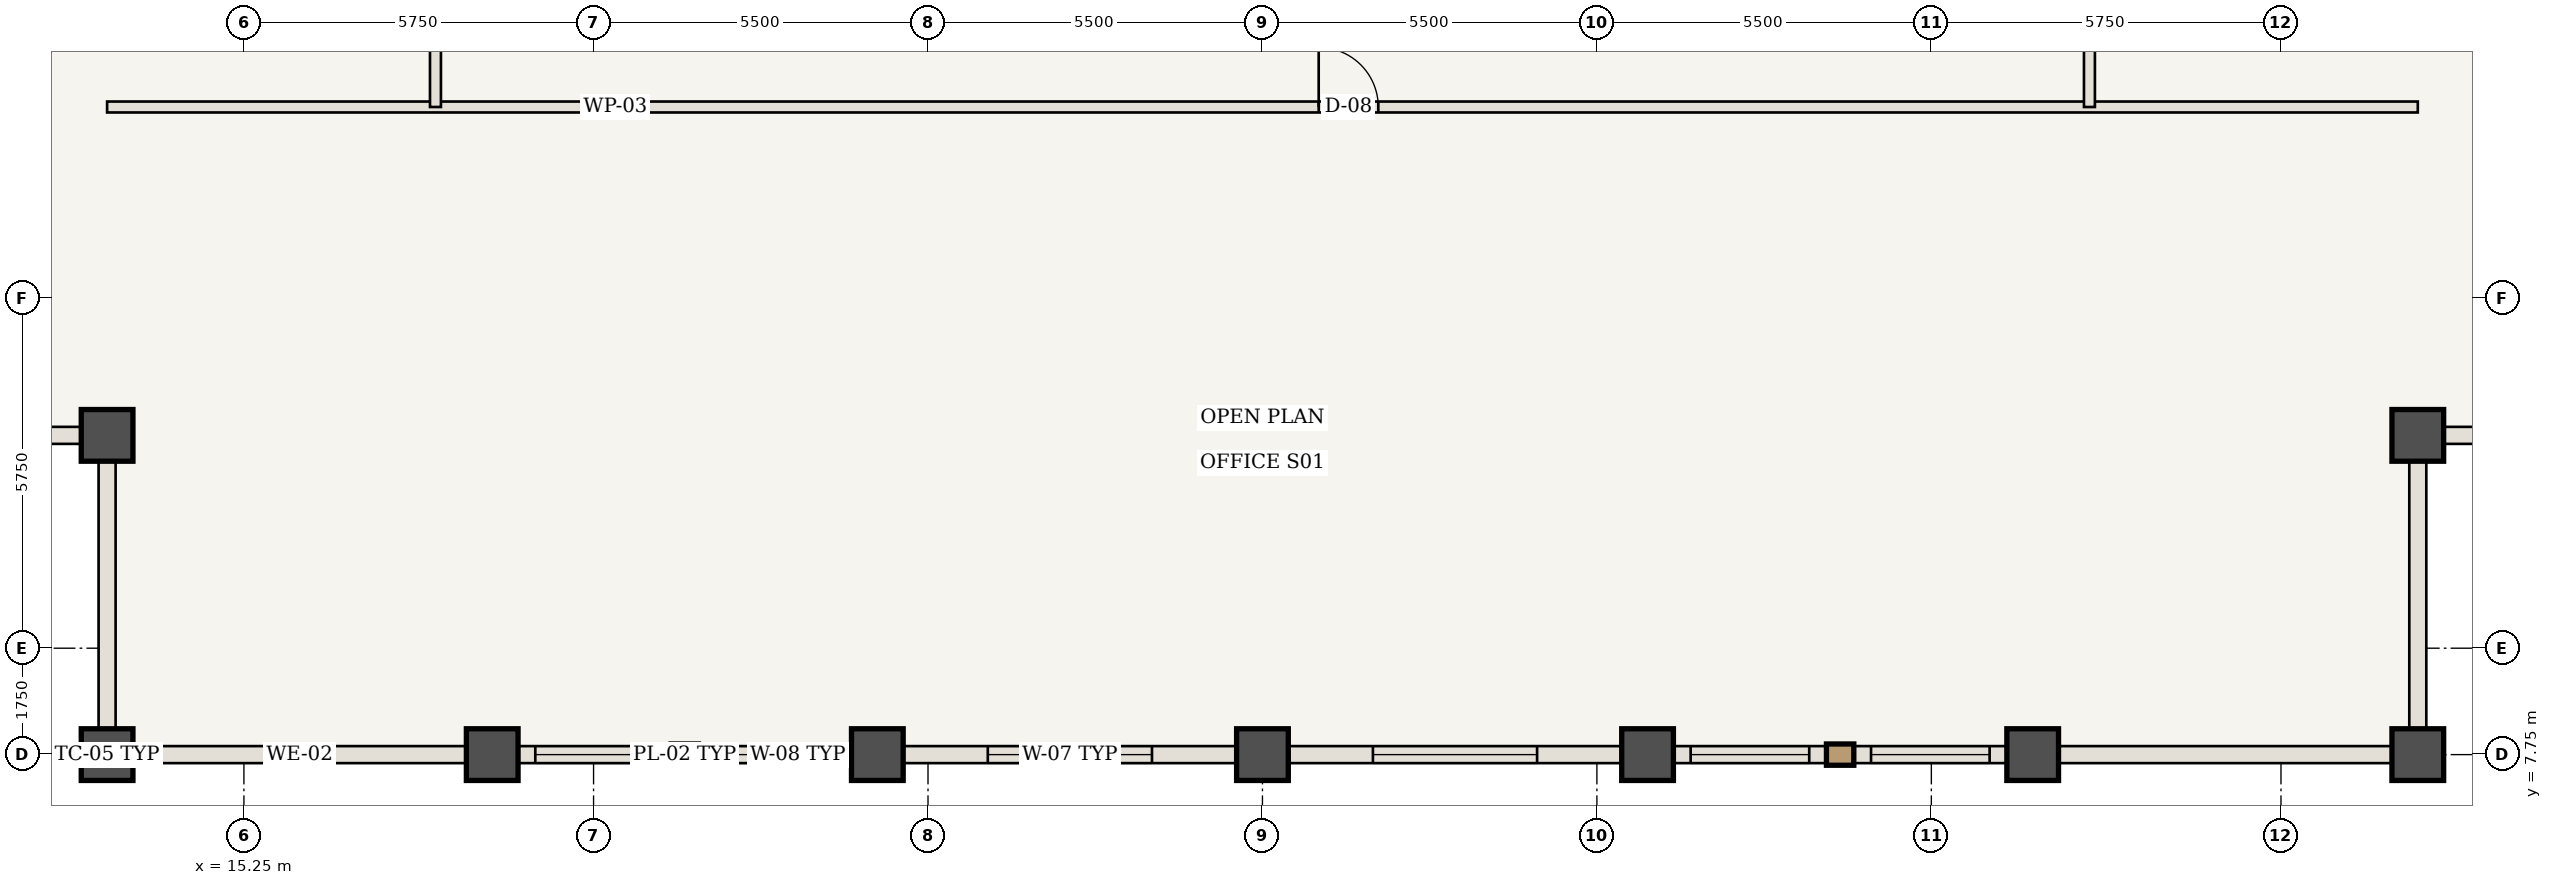
"""IFC4 building model, lengths in metres.
Left out: names, types, materials, properties, quantities, classifications, styles, units other than length and angle.
Written with IfcOpenShell. Run it as: python <this file> out.ifc"""

import sys

from ifc_helpers import new_model, si_unit, direction, frame, frame_2d, origin, origin_2d, place, context, subcontext, project, spatial, rectangle, extrude, element, fill, save


model = new_model("IFC4")
c1 = context("Model", 3, precision=1e-05, world=origin(), true_north=direction((0.0, 1.0)))
c2 = subcontext(c1, "Body", "Model", "MODEL_VIEW")
j1 = project(units=[si_unit("LENGTHUNIT", "METRE"), si_unit("PLANEANGLEUNIT", "RADIAN")], contexts=[c1])
p1 = place(None, origin())
s1 = spatial("IfcSite", under=j1, at=p1, CompositionType="ELEMENT")
p2 = place(p1, origin())
s2 = spatial("IfcBuilding", under=s1, at=p2, CompositionType="ELEMENT")
p3 = place(p2, frame((0.0, 0.0, 186.9)))
s3 = spatial("IfcBuildingStorey", under=s2, at=p3, CompositionType="ELEMENT", Elevation=186.9)
for number, where, z_axis, x_axis in (
    (1, (13.0, 7.75, 0.0), (0.0, 0.0, 1.0), (1.0, 0.0, 0.0)),
    (2, (13.0, 13.0, 0.0), (0.0, 0.0, 1.0), (1.0, 0.0, 0.0)),
    (3, (51.0, 7.75, 0.0), (0.0, 0.0, 1.0), (1.0, 0.0, 0.0)),
    (4, (51.0, 13.0, 0.0), (0.0, 0.0, 1.0), (1.0, 0.0, 0.0)),
    (5, (19.333, 7.75, 0.0), (0.0, 0.0, 1.0), (1.0, 0.0, 0.0)),
    (6, (25.667, 7.75, 0.0), (0.0, 0.0, 1.0), (1.0, 0.0, 0.0)),
    (7, (32.0, 7.75, 0.0), (0.0, 0.0, 1.0), (1.0, 0.0, 0.0)),
    (8, (38.333, 7.75, 0.0), (0.0, 0.0, 1.0), (1.0, 0.0, 0.0)),
    (9, (44.667, 7.75, 0.0), (0.0, 0.0, 1.0), (1.0, 0.0, 0.0)),
):
    element("IfcColumn", number, at=place(p3, frame(where, z_axis=z_axis, x_axis=x_axis)), inside=s3, PredefinedType="COLUMN", context=c2, shape_type="SweptSolid", body=[
        extrude(rectangle(XDim=0.85, YDim=0.85, at=origin_2d()), origin(), (0.0, 0.0, 1.0), 3.85),
    ])
p4 = place(p3, frame((13.0, 18.4, 0.0), z_axis=(0.0, 0.0, 1.0), x_axis=(1.0, 0.0, 0.0)))
e10 = element("IfcWall", 10, at=p4, inside=s3, PredefinedType="STANDARD", context=c2, shape_type="SweptSolid", body=[
    extrude(rectangle(XDim=38.0, YDim=0.18, at=frame_2d((19.0, 0.0))), origin(), (0.0, 0.0, 1.0), 3.43),
])
p5 = place(p4, frame((19.925, 0.0, 0.0)))
e11 = element("IfcOpeningElement", 11, at=p5, cuts=e10, PredefinedType="OPENING", context=c2, shape_type="SweptSolid", body=[
    extrude(rectangle(XDim=0.98, YDim=2.2, at=frame_2d((0.49, 1.1))), frame((0.0, 0.1, 0.0), z_axis=(0.0, -1.0, 0.0), x_axis=(1.0, 0.0, 0.0)), (0.0, 0.0, 1.0), 0.2),
])
p6 = place(p3, frame((18.4, 18.4, 0.0), z_axis=(0.0, 0.0, 1.0), x_axis=(0.0, 1.0, 0.0)))
e12 = element("IfcWall", 12, at=p6, inside=s3, PredefinedType="STANDARD", context=c2, shape_type="SweptSolid", body=[
    extrude(rectangle(XDim=6.317, YDim=0.18, at=frame_2d((3.158, 0.0))), origin(), (0.0, 0.0, 1.0), 3.43),
])
p7 = place(p6, frame((1.208, 0.0, 0.0)))
e13 = element("IfcOpeningElement", 13, at=p7, cuts=e12, PredefinedType="OPENING", context=c2, shape_type="SweptSolid", body=[
    extrude(rectangle(XDim=0.98, YDim=2.2, at=frame_2d((0.49, 1.1))), frame((0.0, 0.1, 0.0), z_axis=(0.0, -1.0, 0.0), x_axis=(1.0, 0.0, 0.0)), (0.0, 0.0, 1.0), 0.2),
])
p8 = place(p3, frame((45.6, 18.4, 0.0), z_axis=(0.0, 0.0, 1.0), x_axis=(0.0, 1.0, 0.0)))
e14 = element("IfcWall", 14, at=p8, inside=s3, PredefinedType="STANDARD", context=c2, shape_type="SweptSolid", body=[
    extrude(rectangle(XDim=13.4, YDim=0.18, at=frame_2d((6.7, 0.0))), origin(), (0.0, 0.0, 1.0), 3.43),
])
p9 = place(p8, frame((6.2, 0.0, 0.0)))
e15 = element("IfcOpeningElement", 15, at=p9, cuts=e14, PredefinedType="OPENING", context=c2, shape_type="SweptSolid", body=[
    extrude(rectangle(XDim=0.98, YDim=2.2, at=frame_2d((0.49, 1.1))), frame((0.0, 0.1, 0.0), z_axis=(0.0, -1.0, 0.0), x_axis=(1.0, 0.0, 0.0)), (0.0, 0.0, 1.0), 0.2),
])
p10 = place(p3, frame((19.333, 7.75, 0.0), z_axis=(0.0, 0.0, 1.0), x_axis=(-1.0, 0.0, 0.0)))
e16 = element("IfcWall", 16, at=p10, inside=s3, PredefinedType="USERDEFINED", context=c2, shape_type="SweptSolid", body=[
    extrude(rectangle(XDim=6.333, YDim=0.28, at=frame_2d((3.167, 0.0))), origin(), (0.0, 0.0, 1.0), 2.73),
])
p11 = place(p3, frame((25.667, 7.75, 0.0), z_axis=(0.0, 0.0, 1.0), x_axis=(-1.0, 0.0, 0.0)))
e17 = element("IfcWall", 17, at=p11, inside=s3, PredefinedType="USERDEFINED", context=c2, shape_type="SweptSolid", body=[
    extrude(rectangle(XDim=6.333, YDim=0.28, at=frame_2d((3.167, 0.0))), origin(), (0.0, 0.0, 1.0), 2.73),
])
p12 = place(p11, frame((0.708, 0.0, 0.85)))
e18 = element("IfcOpeningElement", 18, at=p12, cuts=e17, PredefinedType="OPENING", context=c2, shape_type="SweptSolid", body=[
    extrude(rectangle(XDim=1.95, YDim=1.68, at=frame_2d((0.975, 0.84))), frame((0.0, 0.15, 0.0), z_axis=(0.0, -1.0, 0.0), x_axis=(1.0, 0.0, 0.0)), (0.0, 0.0, 1.0), 0.3),
])
p13 = place(p11, frame((3.675, 0.0, 0.85)))
e19 = element("IfcOpeningElement", 19, at=p13, cuts=e17, PredefinedType="OPENING", context=c2, shape_type="SweptSolid", body=[
    extrude(rectangle(XDim=1.95, YDim=1.68, at=frame_2d((0.975, 0.84))), frame((0.0, 0.15, 0.0), z_axis=(0.0, -1.0, 0.0), x_axis=(1.0, 0.0, 0.0)), (0.0, 0.0, 1.0), 0.3),
])
p14 = place(p3, frame((32.0, 7.75, 0.0), z_axis=(0.0, 0.0, 1.0), x_axis=(-1.0, 0.0, 0.0)))
e20 = element("IfcWall", 20, at=p14, inside=s3, PredefinedType="USERDEFINED", context=c2, shape_type="SweptSolid", body=[
    extrude(rectangle(XDim=6.333, YDim=0.28, at=frame_2d((3.167, 0.0))), origin(), (0.0, 0.0, 1.0), 2.73),
])
p15 = place(p14, frame((1.817, 0.0, 0.85)))
e21 = element("IfcOpeningElement", 21, at=p15, cuts=e20, PredefinedType="OPENING", context=c2, shape_type="SweptSolid", body=[
    extrude(rectangle(XDim=2.7, YDim=1.68, at=frame_2d((1.35, 0.84))), frame((0.0, 0.15, 0.0), z_axis=(0.0, -1.0, 0.0), x_axis=(1.0, 0.0, 0.0)), (0.0, 0.0, 1.0), 0.3),
])
p16 = place(p3, frame((38.333, 7.75, 0.0), z_axis=(0.0, 0.0, 1.0), x_axis=(-1.0, 0.0, 0.0)))
e22 = element("IfcWall", 22, at=p16, inside=s3, PredefinedType="USERDEFINED", context=c2, shape_type="SweptSolid", body=[
    extrude(rectangle(XDim=6.333, YDim=0.28, at=frame_2d((3.167, 0.0))), origin(), (0.0, 0.0, 1.0), 2.73),
])
p17 = place(p16, frame((1.817, 0.0, 0.85)))
e23 = element("IfcOpeningElement", 23, at=p17, cuts=e22, PredefinedType="OPENING", context=c2, shape_type="SweptSolid", body=[
    extrude(rectangle(XDim=2.7, YDim=1.68, at=frame_2d((1.35, 0.84))), frame((0.0, 0.15, 0.0), z_axis=(0.0, -1.0, 0.0), x_axis=(1.0, 0.0, 0.0)), (0.0, 0.0, 1.0), 0.3),
])
p18 = place(p3, frame((44.667, 7.75, 0.0), z_axis=(0.0, 0.0, 1.0), x_axis=(-1.0, 0.0, 0.0)))
e24 = element("IfcWall", 24, at=p18, inside=s3, PredefinedType="USERDEFINED", context=c2, shape_type="SweptSolid", body=[
    extrude(rectangle(XDim=6.333, YDim=0.28, at=frame_2d((3.167, 0.0))), origin(), (0.0, 0.0, 1.0), 2.73),
])
p19 = place(p18, frame((0.708, 0.0, 0.85)))
e25 = element("IfcOpeningElement", 25, at=p19, cuts=e24, PredefinedType="OPENING", context=c2, shape_type="SweptSolid", body=[
    extrude(rectangle(XDim=1.95, YDim=1.68, at=frame_2d((0.975, 0.84))), frame((0.0, 0.15, 0.0), z_axis=(0.0, -1.0, 0.0), x_axis=(1.0, 0.0, 0.0)), (0.0, 0.0, 1.0), 0.3),
])
p20 = place(p18, frame((3.675, 0.0, 0.85)))
e26 = element("IfcOpeningElement", 26, at=p20, cuts=e24, PredefinedType="OPENING", context=c2, shape_type="SweptSolid", body=[
    extrude(rectangle(XDim=1.95, YDim=1.68, at=frame_2d((0.975, 0.84))), frame((0.0, 0.15, 0.0), z_axis=(0.0, -1.0, 0.0), x_axis=(1.0, 0.0, 0.0)), (0.0, 0.0, 1.0), 0.3),
])
p21 = place(p3, frame((51.0, 7.75, 0.0), z_axis=(0.0, 0.0, 1.0), x_axis=(-1.0, 0.0, 0.0)))
e27 = element("IfcWall", 27, at=p21, inside=s3, PredefinedType="USERDEFINED", context=c2, shape_type="SweptSolid", body=[
    extrude(rectangle(XDim=6.333, YDim=0.28, at=frame_2d((3.167, 0.0))), origin(), (0.0, 0.0, 1.0), 2.73),
])
for number, where, z_axis, x_axis in (
    (28, (13.0, 7.75, 0.0), (0.0, 0.0, 1.0), (0.0, 1.0, 0.0)),
    (29, (13.0, 13.0, 0.0), (0.0, 0.0, 1.0), (-1.0, 0.0, 0.0)),
    (30, (51.0, 13.0, 0.0), (0.0, 0.0, 1.0), (0.0, -1.0, 0.0)),
    (31, (56.25, 13.0, 0.0), (0.0, 0.0, 1.0), (-1.0, 0.0, 0.0)),
):
    element("IfcWall", number, at=place(p3, frame(where, z_axis=z_axis, x_axis=x_axis)), inside=s3, PredefinedType="USERDEFINED", context=c2, shape_type="SweptSolid", body=[
        extrude(rectangle(XDim=5.25, YDim=0.28, at=frame_2d((2.625, 0.0))), origin(), (0.0, 0.0, 1.0), 2.73),
    ])
p22 = place(p5, origin())
e32 = element("IfcDoor", 32, at=p22, inside=s3, OperationType="SINGLE_SWING_LEFT", PredefinedType="DOOR", context=c2, shape_type="SweptSolid", body=[
    extrude(rectangle(XDim=0.98, YDim=2.2, at=frame_2d((0.49, 1.1))), frame((0.0, 0.025, 0.0), z_axis=(0.0, -1.0, 0.0), x_axis=(1.0, 0.0, 0.0)), (0.0, 0.0, 1.0), 0.05),
])
fill(e11, e32)
p23 = place(p12, origin())
e33 = element("IfcWindow", 33, at=p23, inside=s3, PartitioningType="SINGLE_PANEL", PredefinedType="WINDOW", context=c2, shape_type="SweptSolid", body=[
    extrude(rectangle(XDim=1.95, YDim=1.68, at=frame_2d((0.975, 0.84))), frame((0.0, 0.03, 0.0), z_axis=(0.0, -1.0, 0.0), x_axis=(1.0, 0.0, 0.0)), (0.0, 0.0, 1.0), 0.06),
])
fill(e18, e33)
p24 = place(p13, origin())
e34 = element("IfcWindow", 34, at=p24, inside=s3, PartitioningType="SINGLE_PANEL", PredefinedType="WINDOW", context=c2, shape_type="SweptSolid", body=[
    extrude(rectangle(XDim=1.95, YDim=1.68, at=frame_2d((0.975, 0.84))), frame((0.0, 0.03, 0.0), z_axis=(0.0, -1.0, 0.0), x_axis=(1.0, 0.0, 0.0)), (0.0, 0.0, 1.0), 0.06),
])
fill(e19, e34)
p25 = place(p15, origin())
e35 = element("IfcWindow", 35, at=p25, inside=s3, PartitioningType="SINGLE_PANEL", PredefinedType="WINDOW", context=c2, shape_type="SweptSolid", body=[
    extrude(rectangle(XDim=2.7, YDim=1.68, at=frame_2d((1.35, 0.84))), frame((0.0, 0.03, 0.0), z_axis=(0.0, -1.0, 0.0), x_axis=(1.0, 0.0, 0.0)), (0.0, 0.0, 1.0), 0.06),
])
fill(e21, e35)
p26 = place(p17, origin())
e36 = element("IfcWindow", 36, at=p26, inside=s3, PartitioningType="SINGLE_PANEL", PredefinedType="WINDOW", context=c2, shape_type="SweptSolid", body=[
    extrude(rectangle(XDim=2.7, YDim=1.68, at=frame_2d((1.35, 0.84))), frame((0.0, 0.03, 0.0), z_axis=(0.0, -1.0, 0.0), x_axis=(1.0, 0.0, 0.0)), (0.0, 0.0, 1.0), 0.06),
])
fill(e23, e36)
p27 = place(p19, origin())
e37 = element("IfcWindow", 37, at=p27, inside=s3, PartitioningType="SINGLE_PANEL", PredefinedType="WINDOW", context=c2, shape_type="SweptSolid", body=[
    extrude(rectangle(XDim=1.95, YDim=1.68, at=frame_2d((0.975, 0.84))), frame((0.0, 0.03, 0.0), z_axis=(0.0, -1.0, 0.0), x_axis=(1.0, 0.0, 0.0)), (0.0, 0.0, 1.0), 0.06),
])
fill(e25, e37)
p28 = place(p20, origin())
e38 = element("IfcWindow", 38, at=p28, inside=s3, PartitioningType="SINGLE_PANEL", PredefinedType="WINDOW", context=c2, shape_type="SweptSolid", body=[
    extrude(rectangle(XDim=1.95, YDim=1.68, at=frame_2d((0.975, 0.84))), frame((0.0, 0.03, 0.0), z_axis=(0.0, -1.0, 0.0), x_axis=(1.0, 0.0, 0.0)), (0.0, 0.0, 1.0), 0.06),
])
fill(e26, e38)
save(model, sys.argv[1])
